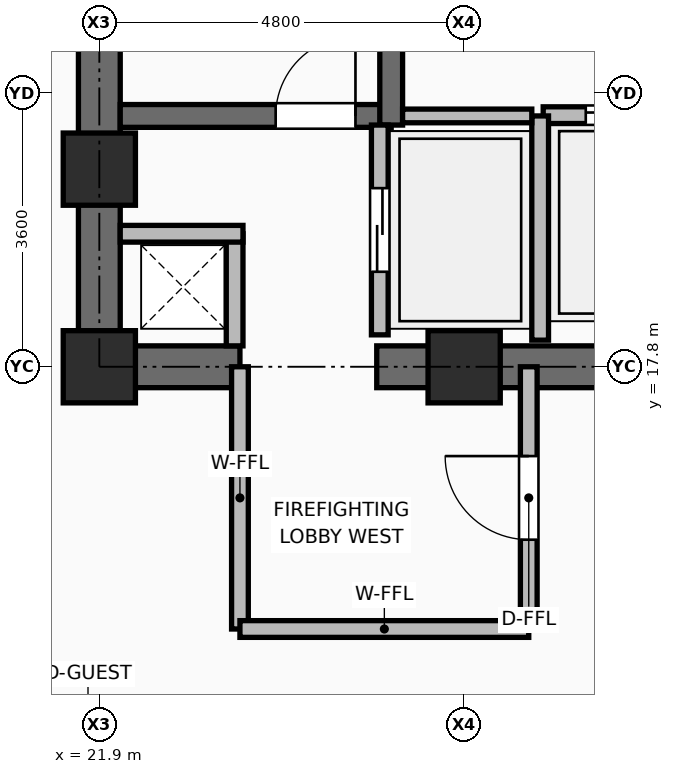
"""IFC4 building model, lengths in metres.
Left out: names, types, materials, properties, quantities, classifications, styles, units other than length and angle.
Written with IfcOpenShell. Run it as: python <this file> out.ifc"""

import sys

from ifc_helpers import new_model, si_unit, direction, frame, frame_2d, origin, origin_2d, place, context, subcontext, project, spatial, rectangle, extrude, element, fill, save


model = new_model("IFC4")
c1 = context("Model", 3, precision=1e-05, world=origin(), true_north=direction((0.0, 1.0)))
c2 = subcontext(c1, "Body", "Model", "MODEL_VIEW")
j1 = project(units=[si_unit("LENGTHUNIT", "METRE"), si_unit("PLANEANGLEUNIT", "RADIAN")], contexts=[c1])
p1 = place(None, origin())
s1 = spatial("IfcSite", under=j1, at=p1, CompositionType="ELEMENT")
p2 = place(p1, origin())
s2 = spatial("IfcBuilding", under=s1, at=p2, CompositionType="ELEMENT")
p3 = place(p2, frame((0.0, 0.0, 149.7)))
s3 = spatial("IfcBuildingStorey", under=s2, at=p3, CompositionType="ELEMENT", Elevation=149.7)
for number, where, z_axis, x_axis in (
    (1, (21.9, 17.8, 0.0), (0.0, 0.0, 1.0), (1.0, 0.0, 0.0)),
    (2, (26.7, 17.8, 0.0), (0.0, 0.0, 1.0), (1.0, 0.0, 0.0)),
    (3, (21.9, 20.4, 0.0), (0.0, 0.0, 1.0), (1.0, 0.0, 0.0)),
):
    element("IfcColumn", number, at=place(p3, frame(where, z_axis=z_axis, x_axis=x_axis)), inside=s3, PredefinedType="COLUMN", context=c2, shape_type="SweptSolid", body=[
        extrude(rectangle(XDim=0.95, YDim=0.95, at=origin_2d()), origin(), (0.0, 0.0, 1.0), 3.75),
    ])
p4 = place(p3, frame((21.625, 17.8, 0.0), z_axis=(0.0, 0.0, 1.0), x_axis=(1.0, 0.0, 0.0)))
e4 = element("IfcWall", 4, at=p4, inside=s3, PredefinedType="SHEAR", context=c2, shape_type="SweptSolid", body=[
    extrude(rectangle(XDim=2.125, YDim=0.55, at=frame_2d((1.062, 0.0))), origin(), (0.0, 0.0, 1.0), 3.57),
])
p5 = place(p3, frame((25.55, 17.8, 0.0), z_axis=(0.0, 0.0, 1.0), x_axis=(1.0, 0.0, 0.0)))
e5 = element("IfcWall", 5, at=p5, inside=s3, PredefinedType="SHEAR", context=c2, shape_type="SweptSolid", body=[
    extrude(rectangle(XDim=6.9, YDim=0.55, at=frame_2d((3.45, 0.0))), origin(), (0.0, 0.0, 1.0), 3.57),
])
p6 = place(p3, frame((21.9, 18.075, 0.0), z_axis=(0.0, 0.0, 1.0), x_axis=(0.0, 1.0, 0.0)))
e6 = element("IfcWall", 6, at=p6, inside=s3, PredefinedType="SHEAR", context=c2, shape_type="SweptSolid", body=[
    extrude(rectangle(XDim=14.1, YDim=0.55, at=frame_2d((7.05, 0.0))), origin(), (0.0, 0.0, 1.0), 3.57),
])
p7 = place(p3, frame((22.175, 21.1, 0.0), z_axis=(0.0, 0.0, 1.0), x_axis=(1.0, 0.0, 0.0)))
e7 = element("IfcWall", 7, at=p7, inside=s3, PredefinedType="SHEAR", context=c2, shape_type="SweptSolid", body=[
    extrude(rectangle(XDim=3.565, YDim=0.3, at=frame_2d((1.782, 0.0))), origin(), (0.0, 0.0, 1.0), 3.57),
])
p8 = place(p7, frame((2.045, 0.0, 0.0)))
e8 = element("IfcOpeningElement", 8, at=p8, cuts=e7, PredefinedType="OPENING", context=c2, shape_type="SweptSolid", body=[
    extrude(rectangle(XDim=1.05, YDim=2.1, at=frame_2d((0.525, 1.05))), frame((0.0, 0.16, 0.0), z_axis=(0.0, -1.0, 0.0), x_axis=(1.0, 0.0, 0.0)), (0.0, 0.0, 1.0), 0.32),
])
p9 = place(p3, frame((25.74, 20.98, 0.0), z_axis=(0.0, 0.0, 1.0), x_axis=(0.0, 1.0, 0.0)))
e9 = element("IfcWall", 9, at=p9, inside=s3, PredefinedType="SHEAR", context=c2, shape_type="SweptSolid", body=[
    extrude(rectangle(XDim=7.99, YDim=0.3, at=frame_2d((3.995, 0.0))), origin(), (0.0, 0.0, 1.0), 3.57),
])
p10 = place(p3, frame((23.68, 18.075, 0.0), z_axis=(0.0, 0.0, 1.0), x_axis=(0.0, 1.0, 0.0)))
e10 = element("IfcWall", 10, at=p10, inside=s3, PredefinedType="PARTITIONING", context=c2, shape_type="SweptSolid", body=[
    extrude(rectangle(XDim=1.475, YDim=0.22, at=frame_2d((0.738, 0.0))), origin(), (0.0, 0.0, 1.0), 3.55),
])
p11 = place(p3, frame((22.175, 19.55, 0.0), z_axis=(0.0, 0.0, 1.0), x_axis=(1.0, 0.0, 0.0)))
e11 = element("IfcWall", 11, at=p11, inside=s3, PredefinedType="PARTITIONING", context=c2, shape_type="SweptSolid", body=[
    extrude(rectangle(XDim=1.615, YDim=0.22, at=frame_2d((0.808, 0.0))), origin(), (0.0, 0.0, 1.0), 2.595),
])
p12 = place(p3, frame((25.59, 18.22, 0.0), z_axis=(0.0, 0.0, 1.0), x_axis=(0.0, 1.0, 0.0)))
e12 = element("IfcWall", 12, at=p12, inside=s3, PredefinedType="PARTITIONING", context=c2, shape_type="SweptSolid", body=[
    extrude(rectangle(XDim=2.76, YDim=0.22, at=frame_2d((1.38, 0.0))), origin(), (0.0, 0.0, 1.0), 3.55),
])
p13 = place(p12, frame((0.83, 0.0, 0.0)))
e13 = element("IfcOpeningElement", 13, at=p13, cuts=e12, PredefinedType="OPENING", context=c2, shape_type="SweptSolid", body=[
    extrude(rectangle(XDim=1.1, YDim=2.2, at=frame_2d((0.55, 1.1))), frame((0.0, 0.12, 0.0), z_axis=(0.0, -1.0, 0.0), x_axis=(1.0, 0.0, 0.0)), (0.0, 0.0, 1.0), 0.24),
])
p14 = place(p3, frame((27.74, 21.11, 0.0), z_axis=(0.0, 0.0, 1.0), x_axis=(1.0, 0.0, 0.0)))
e14 = element("IfcWall", 14, at=p14, inside=s3, PredefinedType="PARTITIONING", context=c2, shape_type="SweptSolid", body=[
    extrude(rectangle(XDim=2.22, YDim=0.22, at=frame_2d((1.11, 0.0))), origin(), (0.0, 0.0, 1.0), 3.55),
])
p15 = place(p14, frame((0.56, 0.0, 0.0)))
e15 = element("IfcOpeningElement", 15, at=p15, cuts=e14, PredefinedType="OPENING", context=c2, shape_type="SweptSolid", body=[
    extrude(rectangle(XDim=1.1, YDim=2.2, at=frame_2d((0.55, 1.1))), frame((0.0, 0.12, 0.0), z_axis=(0.0, -1.0, 0.0), x_axis=(1.0, 0.0, 0.0)), (0.0, 0.0, 1.0), 0.24),
])
p16 = place(p3, frame((27.7, 18.15, 0.0), z_axis=(0.0, 0.0, 1.0), x_axis=(0.0, 1.0, 0.0)))
e16 = element("IfcWall", 16, at=p16, inside=s3, PredefinedType="PARTITIONING", context=c2, shape_type="SweptSolid", body=[
    extrude(rectangle(XDim=2.95, YDim=0.22, at=frame_2d((1.475, 0.0))), origin(), (0.0, 0.0, 1.0), 3.55),
])
p17 = place(p3, frame((25.89, 21.1, 0.0), z_axis=(0.0, 0.0, 1.0), x_axis=(1.0, 0.0, 0.0)))
e17 = element("IfcWall", 17, at=p17, inside=s3, PredefinedType="PARTITIONING", context=c2, shape_type="SweptSolid", body=[
    extrude(rectangle(XDim=1.7, YDim=0.18, at=frame_2d((0.85, 0.0))), origin(), (0.0, 0.0, 1.0), 3.55),
])
p18 = place(p3, frame((23.75, 14.35, 0.0), z_axis=(0.0, 0.0, 1.0), x_axis=(0.0, 1.0, 0.0)))
e18 = element("IfcWall", 18, at=p18, inside=s3, PredefinedType="PARTITIONING", context=c2, shape_type="SweptSolid", body=[
    extrude(rectangle(XDim=3.45, YDim=0.22, at=frame_2d((1.725, 0.0))), origin(), (0.0, 0.0, 1.0), 3.006),
])
p19 = place(p3, frame((23.75, 14.35, 0.0), z_axis=(0.0, 0.0, 1.0), x_axis=(1.0, 0.0, 0.0)))
e19 = element("IfcWall", 19, at=p19, inside=s3, PredefinedType="PARTITIONING", context=c2, shape_type="SweptSolid", body=[
    extrude(rectangle(XDim=3.8, YDim=0.22, at=frame_2d((1.9, 0.0))), origin(), (0.0, 0.0, 1.0), 3.55),
])
p20 = place(p3, frame((27.55, 14.35, 0.0), z_axis=(0.0, 0.0, 1.0), x_axis=(0.0, 1.0, 0.0)))
e20 = element("IfcWall", 20, at=p20, inside=s3, PredefinedType="PARTITIONING", context=c2, shape_type="SweptSolid", body=[
    extrude(rectangle(XDim=3.45, YDim=0.22, at=frame_2d((1.725, 0.0))), origin(), (0.0, 0.0, 1.0), 3.006),
])
p21 = place(p20, frame((1.175, 0.0, 0.0)))
e21 = element("IfcOpeningElement", 21, at=p21, cuts=e20, PredefinedType="OPENING", context=c2, shape_type="SweptSolid", body=[
    extrude(rectangle(XDim=1.1, YDim=2.1, at=frame_2d((0.55, 1.05))), frame((0.0, 0.12, 0.0), z_axis=(0.0, -1.0, 0.0), x_axis=(1.0, 0.0, 0.0)), (0.0, 0.0, 1.0), 0.24),
])
p22 = place(p8, origin())
e22 = element("IfcDoor", 22, at=p22, inside=s3, OperationType="SINGLE_SWING_RIGHT", PredefinedType="DOOR", context=c2, shape_type="SweptSolid", body=[
    extrude(rectangle(XDim=1.05, YDim=2.1, at=frame_2d((0.525, 1.05))), frame((0.0, 0.025, 0.0), z_axis=(0.0, -1.0, 0.0), x_axis=(1.0, 0.0, 0.0)), (0.0, 0.0, 1.0), 0.05),
])
fill(e8, e22)
p23 = place(p13, origin())
e23 = element("IfcDoor", 23, at=p23, inside=s3, OperationType="DOUBLE_DOOR_SLIDING", PredefinedType="DOOR", context=c2, shape_type="SweptSolid", body=[
    extrude(rectangle(XDim=1.1, YDim=2.2, at=frame_2d((0.55, 1.1))), frame((0.0, 0.025, 0.0), z_axis=(0.0, -1.0, 0.0), x_axis=(1.0, 0.0, 0.0)), (0.0, 0.0, 1.0), 0.05),
])
fill(e13, e23)
p24 = place(p15, origin())
e24 = element("IfcDoor", 24, at=p24, inside=s3, OperationType="DOUBLE_DOOR_SLIDING", PredefinedType="DOOR", context=c2, shape_type="SweptSolid", body=[
    extrude(rectangle(XDim=1.1, YDim=2.2, at=frame_2d((0.55, 1.1))), frame((0.0, 0.025, 0.0), z_axis=(0.0, -1.0, 0.0), x_axis=(1.0, 0.0, 0.0)), (0.0, 0.0, 1.0), 0.05),
])
fill(e15, e24)
p25 = place(p21, origin())
e25 = element("IfcDoor", 25, at=p25, inside=s3, OperationType="SINGLE_SWING_RIGHT", PredefinedType="DOOR", context=c2, shape_type="SweptSolid", body=[
    extrude(rectangle(XDim=1.1, YDim=2.1, at=frame_2d((0.55, 1.05))), frame((0.0, 0.025, 0.0), z_axis=(0.0, -1.0, 0.0), x_axis=(1.0, 0.0, 0.0)), (0.0, 0.0, 1.0), 0.05),
])
fill(e21, e25)
save(model, sys.argv[1])
